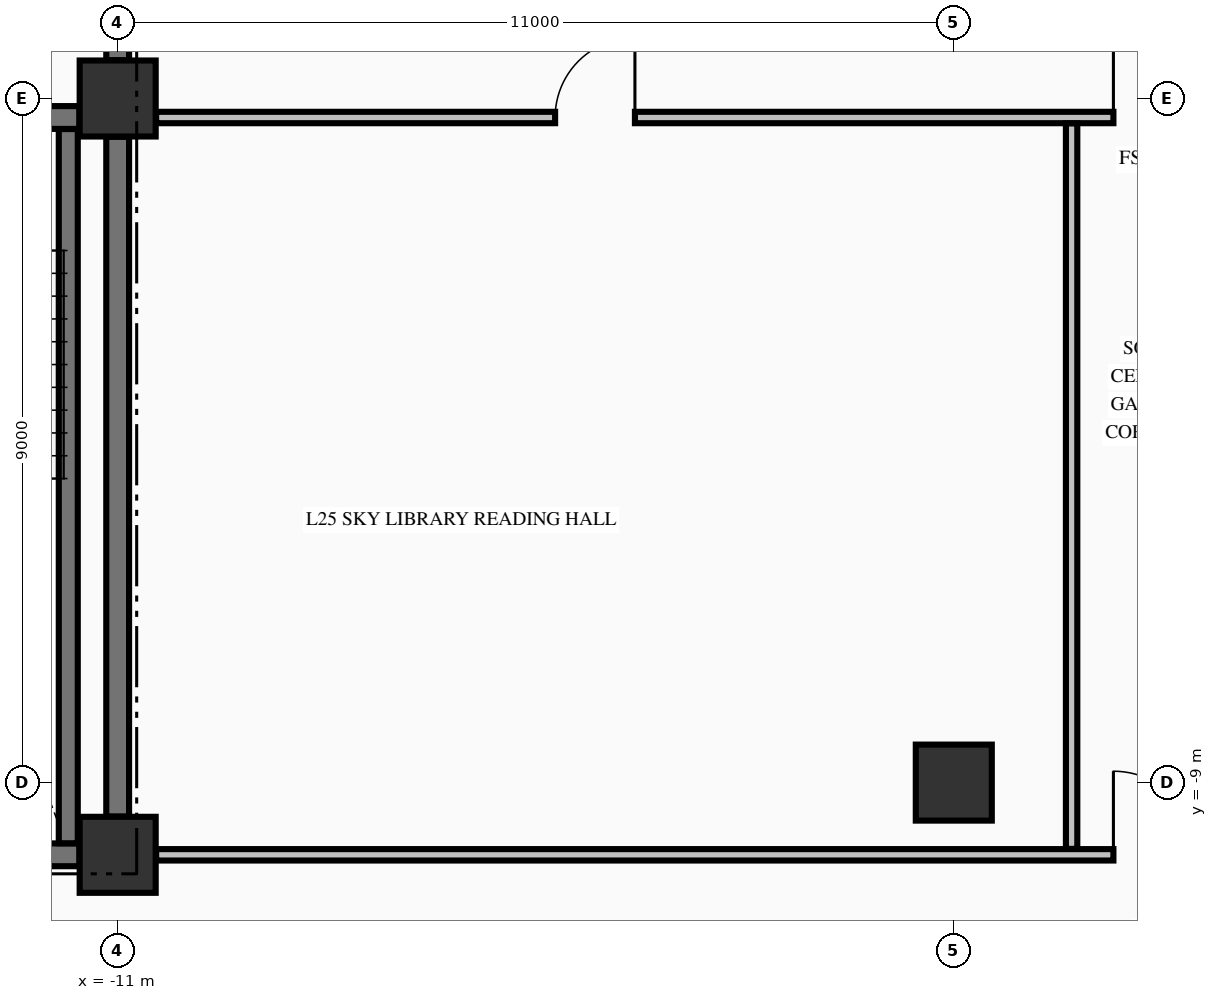
"""IFC4 building model, lengths in metres.
Left out: names, types, materials, properties, quantities, classifications, styles, units other than length and angle.
Written with IfcOpenShell. Run it as: python <this file> out.ifc"""

import sys

from ifc_helpers import new_model, si_unit, direction, frame, frame_2d, origin, origin_2d, place, context, subcontext, project, spatial, rectangle, extrude, element, fill, save


model = new_model("IFC4")
c1 = context("Model", 3, precision=1e-05, world=origin(), true_north=direction((0.0, 1.0)))
c2 = subcontext(c1, "Body", "Model", "MODEL_VIEW")
j1 = project(units=[si_unit("LENGTHUNIT", "METRE"), si_unit("PLANEANGLEUNIT", "RADIAN")], contexts=[c1])
p1 = place(None, origin())
s1 = spatial("IfcSite", under=j1, at=p1, CompositionType="ELEMENT")
p2 = place(p1, origin())
s2 = spatial("IfcBuilding", under=s1, at=p2, CompositionType="ELEMENT")
p3 = place(p2, frame((0.0, 0.0, 102.07)))
s3 = spatial("IfcBuildingStorey", under=s2, at=p3, CompositionType="ELEMENT", Elevation=102.07)
for number, where, z_axis, x_axis in (
    (1, (-11.0, -9.95, -0.25), (0.0, 0.0, 1.0), (1.0, 0.0, 0.0)),
    (2, (-11.0, 0.0, -0.25), (0.0, 0.0, 1.0), (1.0, 0.0, 0.0)),
    (3, (0.0, -9.0, -0.25), (0.0, 0.0, 1.0), (1.0, 0.0, 0.0)),
):
    element("IfcColumn", number, at=place(p3, frame(where, z_axis=z_axis, x_axis=x_axis)), inside=s3, PredefinedType="COLUMN", context=c2, shape_type="SweptSolid", body=[
        extrude(rectangle(XDim=1.0, YDim=1.0, at=origin_2d()), origin(), (0.0, 0.0, 1.0), 3.57),
    ])
p4 = place(p3, frame((-14.7, -9.95, 0.0), z_axis=(0.0, 0.0, 1.0), x_axis=(1.0, 0.0, 0.0)))
e4 = element("IfcWall", 4, at=p4, inside=s3, PredefinedType="SHEAR", context=c2, shape_type="SweptSolid", body=[
    extrude(rectangle(XDim=3.196, YDim=0.3, at=frame_2d((1.598, 0.0))), origin(), (0.0, 0.0, 1.0), 3.32),
])
p5 = place(p3, frame((-19.496, -0.25, 0.0), z_axis=(0.0, 0.0, 1.0), x_axis=(1.0, 0.0, 0.0)))
e5 = element("IfcWall", 5, at=p5, inside=s3, PredefinedType="SHEAR", context=c2, shape_type="SweptSolid", body=[
    extrude(rectangle(XDim=7.992, YDim=0.3, at=frame_2d((3.996, 0.0))), origin(), (0.0, 0.0, 1.0), 3.32),
])
p6 = place(p5, frame((5.796, 0.0, 0.0)))
e6 = element("IfcOpeningElement", 6, at=p6, cuts=e5, PredefinedType="OPENING", context=c2, shape_type="SweptSolid", body=[
    extrude(rectangle(XDim=1.1, YDim=2.15, at=frame_2d((0.55, 1.075))), frame((0.0, 0.16, 0.0), z_axis=(0.0, -1.0, 0.0), x_axis=(1.0, 0.0, 0.0)), (0.0, 0.0, 1.0), 0.32),
])
p7 = place(p3, frame((-10.494, -9.95, 0.0), z_axis=(0.0, 0.0, 1.0), x_axis=(1.0, 0.0, 0.0)))
e7 = element("IfcWall", 7, at=p7, inside=s3, PredefinedType="PARTITIONING", context=c2, shape_type="SweptSolid", body=[
    extrude(rectangle(XDim=20.988, YDim=0.15, at=frame_2d((10.494, 0.0))), origin(), (0.0, 0.0, 1.0), 3.32),
])
p8 = place(p7, frame((12.594, 0.0, 0.0)))
e8 = element("IfcOpeningElement", 8, at=p8, cuts=e7, PredefinedType="OPENING", context=c2, shape_type="SweptSolid", body=[
    extrude(rectangle(XDim=1.1, YDim=2.15, at=frame_2d((0.55, 1.075))), frame((0.0, 0.085, 0.0), z_axis=(0.0, -1.0, 0.0), x_axis=(1.0, 0.0, 0.0)), (0.0, 0.0, 1.0), 0.17),
])
p9 = place(p7, frame((18.799, 0.0, 0.0)))
e9 = element("IfcOpeningElement", 9, at=p9, cuts=e7, PredefinedType="OPENING", context=c2, shape_type="SweptSolid", body=[
    extrude(rectangle(XDim=0.95, YDim=2.15, at=frame_2d((0.475, 1.075))), frame((0.0, 0.085, 0.0), z_axis=(0.0, -1.0, 0.0), x_axis=(1.0, 0.0, 0.0)), (0.0, 0.0, 1.0), 0.17),
])
p10 = place(p3, frame((-10.494, -0.25, 0.0), z_axis=(0.0, 0.0, 1.0), x_axis=(1.0, 0.0, 0.0)))
e10 = element("IfcWall", 10, at=p10, inside=s3, PredefinedType="PARTITIONING", context=c2, shape_type="SweptSolid", body=[
    extrude(rectangle(XDim=20.988, YDim=0.15, at=frame_2d((10.494, 0.0))), origin(), (0.0, 0.0, 1.0), 3.32),
])
p11 = place(p10, frame((12.594, 0.0, 0.0)))
e11 = element("IfcOpeningElement", 11, at=p11, cuts=e10, PredefinedType="OPENING", context=c2, shape_type="SweptSolid", body=[
    extrude(rectangle(XDim=1.1, YDim=2.15, at=frame_2d((0.55, 1.075))), frame((0.0, 0.085, 0.0), z_axis=(0.0, -1.0, 0.0), x_axis=(1.0, 0.0, 0.0)), (0.0, 0.0, 1.0), 0.17),
])
p12 = place(p10, frame((5.249, 0.0, 0.0)))
e12 = element("IfcOpeningElement", 12, at=p12, cuts=e10, PredefinedType="OPENING", context=c2, shape_type="SweptSolid", body=[
    extrude(rectangle(XDim=1.05, YDim=2.15, at=frame_2d((0.525, 1.075))), frame((0.0, 0.085, 0.0), z_axis=(0.0, -1.0, 0.0), x_axis=(1.0, 0.0, 0.0)), (0.0, 0.0, 1.0), 0.17),
])
p13 = place(p10, frame((17.399, 0.0, 0.0)))
e13 = element("IfcOpeningElement", 13, at=p13, cuts=e10, PredefinedType="OPENING", context=c2, shape_type="SweptSolid", body=[
    extrude(rectangle(XDim=0.95, YDim=2.15, at=frame_2d((0.475, 1.075))), frame((0.0, 0.085, 0.0), z_axis=(0.0, -1.0, 0.0), x_axis=(1.0, 0.0, 0.0)), (0.0, 0.0, 1.0), 0.17),
])
p14 = place(p3, frame((-11.65, -9.798, 0.0), z_axis=(0.0, 0.0, 1.0), x_axis=(0.0, 1.0, 0.0)))
e14 = element("IfcWall", 14, at=p14, inside=s3, PredefinedType="SOLIDWALL", context=c2, shape_type="SweptSolid", body=[
    extrude(rectangle(XDim=9.396, YDim=0.25, at=frame_2d((4.698, 0.0))), origin(), (0.0, 0.0, 1.0), 3.32),
])
p15 = place(p3, frame((-11.0, -9.446, 0.0), z_axis=(0.0, 0.0, 1.0), x_axis=(0.0, 1.0, 0.0)))
e15 = element("IfcWall", 15, at=p15, inside=s3, PredefinedType="SHEAR", context=c2, shape_type="SweptSolid", body=[
    extrude(rectangle(XDim=8.942, YDim=0.3, at=frame_2d((4.471, 0.0))), origin(), (0.0, 0.0, 1.0), 3.32),
])
p16 = place(p3, frame((-11.0, 0.504, 0.0), z_axis=(0.0, 0.0, 1.0), x_axis=(0.0, 1.0, 0.0)))
e16 = element("IfcWall", 16, at=p16, inside=s3, PredefinedType="SHEAR", context=c2, shape_type="SweptSolid", body=[
    extrude(rectangle(XDim=2.244, YDim=0.3, at=frame_2d((1.122, 0.0))), origin(), (0.0, 0.0, 1.0), 3.32),
])
p17 = place(p16, frame((0.596, 0.0, 0.0)))
e17 = element("IfcOpeningElement", 17, at=p17, cuts=e16, PredefinedType="OPENING", context=c2, shape_type="SweptSolid", body=[
    extrude(rectangle(XDim=1.1, YDim=2.15, at=frame_2d((0.55, 1.075))), frame((0.0, 0.16, 0.0), z_axis=(0.0, -1.0, 0.0), x_axis=(1.0, 0.0, 0.0)), (0.0, 0.0, 1.0), 0.32),
])
p18 = place(p3, frame((1.55, -9.872, 0.0), z_axis=(0.0, 0.0, 1.0), x_axis=(0.0, 1.0, 0.0)))
e18 = element("IfcWall", 18, at=p18, inside=s3, PredefinedType="PARTITIONING", context=c2, shape_type="SweptSolid", body=[
    extrude(rectangle(XDim=9.544, YDim=0.15, at=frame_2d((4.772, 0.0))), origin(), (0.0, 0.0, 1.0), 3.32),
])
p19 = place(p8, origin())
e19 = element("IfcDoor", 19, at=p19, inside=s3, OperationType="SINGLE_SWING_LEFT", PredefinedType="DOOR", context=c2, shape_type="SweptSolid", body=[
    extrude(rectangle(XDim=1.1, YDim=2.15, at=frame_2d((0.55, 1.075))), frame((0.0, 0.025, 0.0), z_axis=(0.0, -1.0, 0.0), x_axis=(1.0, 0.0, 0.0)), (0.0, 0.0, 1.0), 0.05),
])
fill(e8, e19)
p20 = place(p11, origin())
e20 = element("IfcDoor", 20, at=p20, inside=s3, OperationType="SINGLE_SWING_LEFT", PredefinedType="DOOR", context=c2, shape_type="SweptSolid", body=[
    extrude(rectangle(XDim=1.1, YDim=2.15, at=frame_2d((0.55, 1.075))), frame((0.0, 0.025, 0.0), z_axis=(0.0, -1.0, 0.0), x_axis=(1.0, 0.0, 0.0)), (0.0, 0.0, 1.0), 0.05),
])
fill(e11, e20)
p21 = place(p12, origin())
e21 = element("IfcDoor", 21, at=p21, inside=s3, OperationType="SINGLE_SWING_RIGHT", PredefinedType="DOOR", context=c2, shape_type="SweptSolid", body=[
    extrude(rectangle(XDim=1.05, YDim=2.15, at=frame_2d((0.525, 1.075))), frame((0.0, 0.025, 0.0), z_axis=(0.0, -1.0, 0.0), x_axis=(1.0, 0.0, 0.0)), (0.0, 0.0, 1.0), 0.05),
])
fill(e12, e21)
save(model, sys.argv[1])
